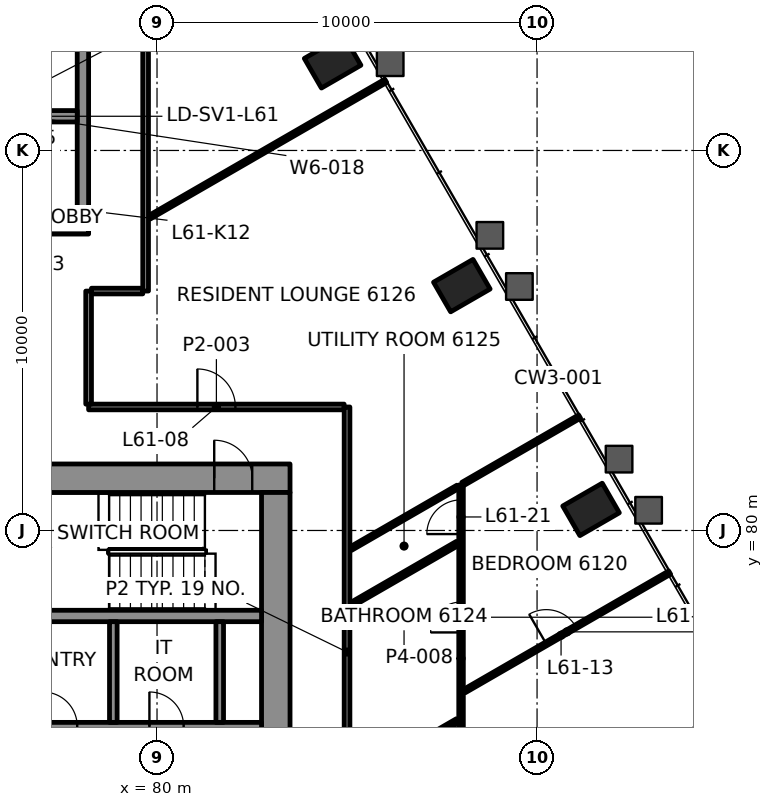
"""IFC4 building model, lengths in metres.
Left out: names, types, materials, properties, quantities, classifications, styles, units other than length and angle.
Written with IfcOpenShell. Run it as: python <this file> out.ifc"""

import sys

from ifc_helpers import new_model, si_unit, direction, frame, frame_2d, origin, origin_2d, place, context, subcontext, project, spatial, rectangle, hollow_rectangle, extrude, element, fill, save


model = new_model("IFC4")
c1 = context("Model", 3, precision=1e-05, world=origin(), true_north=direction((0.0, 1.0)))
c2 = subcontext(c1, "Body", "Model", "MODEL_VIEW")
j1 = project(units=[si_unit("LENGTHUNIT", "METRE"), si_unit("PLANEANGLEUNIT", "RADIAN")], contexts=[c1])
p1 = place(None, origin())
s1 = spatial("IfcSite", under=j1, at=p1, CompositionType="ELEMENT")
p2 = place(p1, origin())
s2 = spatial("IfcBuilding", under=s1, at=p2, CompositionType="ELEMENT")
p3 = place(p2, frame((0.0, 0.0, 260.1)))
s3 = spatial("IfcBuildingStorey", under=s2, at=p3, CompositionType="ELEMENT", Elevation=260.1)
for number, where, z_axis, x_axis in (
    (1, (94.821, 74.666, -0.0), (0.0, 0.0, 1.0), (-0.5, 0.866, 0.0)),
    (2, (91.421, 80.554, -0.0), (0.0, 0.0, 1.0), (-0.5, 0.866, 0.0)),
    (3, (88.021, 86.443, -0.0), (0.0, 0.0, 1.0), (-0.5, 0.866, 0.0)),
    (4, (84.621, 92.332, -0.0), (0.0, 0.0, 1.0), (-0.5, 0.866, 0.0)),
):
    element("IfcColumn", number, at=place(p3, frame(where, z_axis=z_axis, x_axis=x_axis)), inside=s3, PredefinedType="COLUMN", context=c2, shape_type="SweptSolid", body=[
        extrude(hollow_rectangle(XDim=0.9, YDim=1.2, WallThickness=0.06, at=origin_2d()), origin(), (0.0, 0.0, 1.0), 3.5),
    ])
p4 = place(p3, frame((66.5, 81.375, 0.0), z_axis=(0.0, 0.0, 1.0), x_axis=(1.0, 0.0, 0.0)))
e5 = element("IfcWall", 5, at=p4, inside=s3, PredefinedType="SHEAR", context=c2, shape_type="SweptSolid", body=[
    extrude(rectangle(XDim=17.0, YDim=0.75, at=frame_2d((8.5, 0.0))), origin(), (0.0, 0.0, 1.0), 3.3),
])
p5 = place(p4, frame((1.195, 0.0, 0.0)))
e6 = element("IfcOpeningElement", 6, at=p5, cuts=e5, PredefinedType="OPENING", context=c2, shape_type="SweptSolid", body=[
    extrude(rectangle(XDim=1.0, YDim=2.1, at=frame_2d((0.5, 1.05))), frame((0.0, 0.385, 0.0), z_axis=(0.0, -1.0, 0.0), x_axis=(1.0, 0.0, 0.0)), (0.0, 0.0, 1.0), 0.77),
])
p6 = place(p4, frame((15.005, 0.0, 0.0)))
e7 = element("IfcOpeningElement", 7, at=p6, cuts=e5, PredefinedType="OPENING", context=c2, shape_type="SweptSolid", body=[
    extrude(rectangle(XDim=1.0, YDim=2.1, at=frame_2d((0.5, 1.05))), frame((0.0, 0.385, 0.0), z_axis=(0.0, -1.0, 0.0), x_axis=(1.0, 0.0, 0.0)), (0.0, 0.0, 1.0), 0.77),
])
p7 = place(p4, frame((8.15, 0.0, 0.0)))
e8 = element("IfcOpeningElement", 8, at=p7, cuts=e5, PredefinedType="OPENING", context=c2, shape_type="SweptSolid", body=[
    extrude(rectangle(XDim=0.9, YDim=2.1, at=frame_2d((0.45, 1.05))), frame((0.0, 0.385, 0.0), z_axis=(0.0, -1.0, 0.0), x_axis=(1.0, 0.0, 0.0)), (0.0, 0.0, 1.0), 0.77),
])
p8 = place(p3, frame((83.125, 69.0, 0.0), z_axis=(0.0, 0.0, 1.0), x_axis=(0.0, 1.0, 0.0)))
e9 = element("IfcWall", 9, at=p8, inside=s3, PredefinedType="SHEAR", context=c2, shape_type="SweptSolid", body=[
    extrude(rectangle(XDim=12.0, YDim=0.75, at=frame_2d((6.0, 0.0))), origin(), (0.0, 0.0, 1.0), 3.3),
])
p9 = place(p8, frame((3.4, 0.0, 0.0)))
e10 = element("IfcOpeningElement", 10, at=p9, cuts=e9, PredefinedType="OPENING", context=c2, shape_type="SweptSolid", body=[
    extrude(rectangle(XDim=1.8, YDim=2.1, at=frame_2d((0.9, 1.05))), frame((0.0, 0.385, 0.0), z_axis=(0.0, -1.0, 0.0), x_axis=(1.0, 0.0, 0.0)), (0.0, 0.0, 1.0), 0.77),
])
p10 = place(p3, frame((67.25, 77.75, 0.0), z_axis=(0.0, 0.0, 1.0), x_axis=(1.0, 0.0, 0.0)))
e11 = element("IfcWall", 11, at=p10, inside=s3, PredefinedType="SHEAR", context=c2, shape_type="SweptSolid", body=[
    extrude(rectangle(XDim=15.5, YDim=0.3, at=frame_2d((7.75, 0.0))), origin(), (0.0, 0.0, 1.0), 3.3),
])
p11 = place(p10, frame((0.445, 0.0, 0.0)))
e12 = element("IfcOpeningElement", 12, at=p11, cuts=e11, PredefinedType="OPENING", context=c2, shape_type="SweptSolid", body=[
    extrude(rectangle(XDim=1.0, YDim=2.1, at=frame_2d((0.5, 1.05))), frame((0.0, 0.16, 0.0), z_axis=(0.0, -1.0, 0.0), x_axis=(1.0, 0.0, 0.0)), (0.0, 0.0, 1.0), 0.32),
])
p12 = place(p3, frame((71.8, 87.95, 0.0), z_axis=(0.0, 0.0, 1.0), x_axis=(1.0, 0.0, 0.0)))
e13 = element("IfcWall", 13, at=p12, inside=s3, PredefinedType="SHEAR", context=c2, shape_type="SweptSolid", body=[
    extrude(rectangle(XDim=6.4, YDim=0.3, at=frame_2d((3.2, 0.0))), origin(), (0.0, 0.0, 1.0), 3.3),
])
p13 = place(p12, frame((1.325, 0.0, 0.0)))
e14 = element("IfcOpeningElement", 14, at=p13, cuts=e13, PredefinedType="OPENING", context=c2, shape_type="SweptSolid", body=[
    extrude(rectangle(XDim=1.0, YDim=2.1, at=frame_2d((0.5, 1.05))), frame((0.0, 0.16, 0.0), z_axis=(0.0, -1.0, 0.0), x_axis=(1.0, 0.0, 0.0)), (0.0, 0.0, 1.0), 0.32),
])
p14 = place(p12, frame((4.125, 0.0, 0.0)))
e15 = element("IfcOpeningElement", 15, at=p14, cuts=e13, PredefinedType="OPENING", context=c2, shape_type="SweptSolid", body=[
    extrude(rectangle(XDim=1.2, YDim=2.1, at=frame_2d((0.6, 1.05))), frame((0.0, 0.16, 0.0), z_axis=(0.0, -1.0, 0.0), x_axis=(1.0, 0.0, 0.0)), (0.0, 0.0, 1.0), 0.32),
])
p15 = place(p3, frame((78.05, 88.1, 0.0), z_axis=(0.0, 0.0, 1.0), x_axis=(0.0, 1.0, 0.0)))
e16 = element("IfcWall", 16, at=p15, inside=s3, PredefinedType="SHEAR", context=c2, shape_type="SweptSolid", body=[
    extrude(rectangle(XDim=6.2, YDim=0.3, at=frame_2d((3.1, 0.0))), origin(), (0.0, 0.0, 1.0), 3.3),
])
p16 = place(p3, frame((75.3, 90.9, 0.0), z_axis=(0.0, 0.0, 1.0), x_axis=(1.0, 0.0, 0.0)))
e17 = element("IfcWall", 17, at=p16, inside=s3, PredefinedType="SHEAR", context=c2, shape_type="SweptSolid", body=[
    extrude(rectangle(XDim=2.6, YDim=0.3, at=frame_2d((1.3, 0.0))), origin(), (0.0, 0.0, 1.0), 3.3),
])
p17 = place(p16, frame((0.675, 0.0, 0.0)))
e18 = element("IfcOpeningElement", 18, at=p17, cuts=e17, PredefinedType="OPENING", context=c2, shape_type="SweptSolid", body=[
    extrude(rectangle(XDim=1.1, YDim=2.1, at=frame_2d((0.55, 1.05))), frame((0.0, 0.16, 0.0), z_axis=(0.0, -1.0, 0.0), x_axis=(1.0, 0.0, 0.0)), (0.0, 0.0, 1.0), 0.32),
])
p18 = place(p3, frame((78.2, 83.25, 0.0), z_axis=(0.0, 0.0, 1.0), x_axis=(1.0, 0.0, 0.0)))
e19 = element("IfcWall", 19, at=p18, inside=s3, PredefinedType="PARTITIONING", context=c2, shape_type="SweptSolid", body=[
    extrude(rectangle(XDim=6.725, YDim=0.15, at=frame_2d((3.362, 0.0))), origin(), (0.0, 0.0, 1.0), 2.7),
])
p19 = place(p18, frame((2.862, 0.0, 0.0)))
e20 = element("IfcOpeningElement", 20, at=p19, cuts=e19, PredefinedType="OPENING", context=c2, shape_type="SweptSolid", body=[
    extrude(rectangle(XDim=1.0, YDim=2.1, at=frame_2d((0.5, 1.05))), frame((0.0, 0.085, 0.0), z_axis=(0.0, -1.0, 0.0), x_axis=(1.0, 0.0, 0.0)), (0.0, 0.0, 1.0), 0.17),
])
p20 = place(p3, frame((78.275, 86.3, 0.0), z_axis=(0.0, 0.0, 1.0), x_axis=(1.0, 0.0, 0.0)))
e21 = element("IfcWall", 21, at=p20, inside=s3, PredefinedType="PARTITIONING", context=c2, shape_type="SweptSolid", body=[
    extrude(rectangle(XDim=1.35, YDim=0.15, at=frame_2d((0.675, 0.0))), origin(), (0.0, 0.0, 1.0), 2.7),
])
p21 = place(p3, frame((85.11, 73.379, 0.0), z_axis=(0.0, 0.0, 1.0), x_axis=(0.866000447062, 0.500043223821, 0.0)))
e22 = element("IfcWall", 22, at=p21, inside=s3, PredefinedType="PARTITIONING", context=c2, shape_type="SweptSolid", body=[
    extrude(rectangle(XDim=3.228, YDim=0.12, at=frame_2d((1.614, 0.0))), origin(), (0.0, 0.0, 1.0), 2.7),
])
p22 = place(p3, frame((88.086, 75.773, 0.0), z_axis=(0.0, 0.0, 1.0), x_axis=(0.86602136159, 0.500007001221, 0.0)))
e23 = element("IfcWall", 23, at=p22, inside=s3, PredefinedType="PARTITIONING", context=c2, shape_type="SweptSolid", body=[
    extrude(rectangle(XDim=6.239, YDim=0.1, at=frame_2d((3.119, 0.0))), origin(), (0.0, 0.0, 1.0), 2.688),
])
p23 = place(p22, frame((2.489, 0.0, 0.0)))
e24 = element("IfcOpeningElement", 24, at=p23, cuts=e23, PredefinedType="OPENING", context=c2, shape_type="SweptSolid", body=[
    extrude(rectangle(XDim=0.9, YDim=2.1, at=frame_2d((0.45, 1.05))), frame((0.0, 0.06, 0.0), z_axis=(0.0, -1.0, 0.0), x_axis=(1.0, 0.0, 0.0)), (0.0, 0.0, 1.0), 0.12),
])
p24 = place(p3, frame((85.109, 78.046, 0.0), z_axis=(0.0, 0.0, 1.0), x_axis=(0.866033195618, 0.499986503906, 0.0)))
e25 = element("IfcWall", 25, at=p24, inside=s3, PredefinedType="PARTITIONING", context=c2, shape_type="SweptSolid", body=[
    extrude(rectangle(XDim=3.228, YDim=0.12, at=frame_2d((1.614, 0.0))), origin(), (0.0, 0.0, 1.0), 2.7),
])
p25 = place(p3, frame((85.101, 79.523, 0.0), z_axis=(0.0, 0.0, 1.0), x_axis=(0.866029195513, 0.499993432475, 0.0)))
e26 = element("IfcWall", 26, at=p25, inside=s3, PredefinedType="PARTITIONING", context=c2, shape_type="SweptSolid", body=[
    extrude(rectangle(XDim=3.25, YDim=0.1, at=frame_2d((1.625, 0.0))), origin(), (0.0, 0.0, 1.0), 2.7),
])
p26 = place(p3, frame((79.801, 88.241, 0.0), z_axis=(0.0, 0.0, 1.0), x_axis=(0.866016264047, 0.500015830155, 0.0)))
e27 = element("IfcWall", 27, at=p26, inside=s3, PredefinedType="PARTITIONING", context=c2, shape_type="SweptSolid", body=[
    extrude(rectangle(XDim=7.179, YDim=0.1, at=frame_2d((3.59, 0.0))), origin(), (0.0, 0.0, 1.0), 2.688),
])
p27 = place(p3, frame((88.0, 72.067, 0.0), z_axis=(0.0, 0.0, 1.0), x_axis=(0.0, 1.0, 0.0)))
e28 = element("IfcWall", 28, at=p27, inside=s3, PredefinedType="PARTITIONING", context=c2, shape_type="SweptSolid", body=[
    extrude(rectangle(XDim=9.13, YDim=0.12, at=frame_2d((4.565, 0.0))), origin(), (0.0, 0.0, 1.0), 2.7),
])
p28 = place(p27, frame((1.142, 0.0, 0.0)))
e29 = element("IfcOpeningElement", 29, at=p28, cuts=e28, PredefinedType="OPENING", context=c2, shape_type="SweptSolid", body=[
    extrude(rectangle(XDim=0.9, YDim=2.1, at=frame_2d((0.45, 1.05))), frame((0.0, 0.07, 0.0), z_axis=(0.0, -1.0, 0.0), x_axis=(1.0, 0.0, 0.0)), (0.0, 0.0, 1.0), 0.14),
])
p29 = place(p27, frame((5.25, 0.0, 0.0)))
e30 = element("IfcOpeningElement", 30, at=p29, cuts=e28, PredefinedType="OPENING", context=c2, shape_type="SweptSolid", body=[
    extrude(rectangle(XDim=0.8, YDim=2.1, at=frame_2d((0.4, 1.05))), frame((0.0, 0.07, 0.0), z_axis=(0.0, -1.0, 0.0), x_axis=(1.0, 0.0, 0.0)), (0.0, 0.0, 1.0), 0.14),
])
p30 = place(p27, frame((7.838, 0.0, 0.0)))
e31 = element("IfcOpeningElement", 31, at=p30, cuts=e28, PredefinedType="OPENING", context=c2, shape_type="SweptSolid", body=[
    extrude(rectangle(XDim=0.9, YDim=2.1, at=frame_2d((0.45, 1.05))), frame((0.0, 0.07, 0.0), z_axis=(0.0, -1.0, 0.0), x_axis=(1.0, 0.0, 0.0)), (0.0, 0.0, 1.0), 0.14),
])
p31 = place(p3, frame((85.0, 70.352, 0.0), z_axis=(0.0, 0.0, 1.0), x_axis=(0.0, 1.0, 0.0)))
e32 = element("IfcWall", 32, at=p31, inside=s3, PredefinedType="PARTITIONING", context=c2, shape_type="SweptSolid", body=[
    extrude(rectangle(XDim=12.897, YDim=0.15, at=frame_2d((6.449, 0.0))), origin(), (0.0, 0.0, 1.0), 2.7),
])
p32 = place(p3, frame((79.7, 86.301, 0.0), z_axis=(0.0, 0.0, 1.0), x_axis=(0.0, 1.0, 0.0)))
e33 = element("IfcWall", 33, at=p32, inside=s3, PredefinedType="PARTITIONING", context=c2, shape_type="SweptSolid", body=[
    extrude(rectangle(XDim=9.799, YDim=0.15, at=frame_2d((4.899, 0.0))), origin(), (0.0, 0.0, 1.0), 2.7),
])
p33 = place(p3, frame((78.2, 83.325, 0.0), z_axis=(0.0, 0.0, 1.0), x_axis=(0.0, 1.0, 0.0)))
e34 = element("IfcWall", 34, at=p33, inside=s3, PredefinedType="PARTITIONING", context=c2, shape_type="SweptSolid", body=[
    extrude(rectangle(XDim=2.975, YDim=0.15, at=frame_2d((1.488, 0.0))), origin(), (0.0, 0.0, 1.0), 2.622),
])
p34 = place(p3, frame((88.045, 81.223, 0.0), z_axis=(0.0, 0.0, 1.0), x_axis=(0.866020634781, 0.500008260065, 0.0)))
e35 = element("IfcWall", 35, at=p34, inside=s3, PredefinedType="PARTITIONING", context=c2, shape_type="SweptSolid", body=[
    extrude(rectangle(XDim=3.549, YDim=0.1, at=frame_2d((1.775, 0.0))), origin(), (0.0, 0.0, 1.0), 2.688),
])
p35 = place(p3, frame((76.2, 74.85, 0.0), z_axis=(0.0, 0.0, 1.0), x_axis=(1.0, 0.0, 0.0)))
e36 = element("IfcWall", 36, at=p35, inside=s3, PredefinedType="PARTITIONING", context=c2, shape_type="SweptSolid", body=[
    extrude(rectangle(XDim=6.55, YDim=0.2, at=frame_2d((3.275, 0.0))), origin(), (0.0, 0.0, 1.0), 3.3),
])
p36 = place(p35, frame((0.8, 0.0, 0.0)))
e37 = element("IfcOpeningElement", 37, at=p36, cuts=e36, PredefinedType="OPENING", context=c2, shape_type="SweptSolid", body=[
    extrude(rectangle(XDim=0.9, YDim=2.1, at=frame_2d((0.45, 1.05))), frame((0.0, 0.11, 0.0), z_axis=(0.0, -1.0, 0.0), x_axis=(1.0, 0.0, 0.0)), (0.0, 0.0, 1.0), 0.22),
])
p37 = place(p35, frame((3.6, 0.0, 0.0)))
e38 = element("IfcOpeningElement", 38, at=p37, cuts=e36, PredefinedType="OPENING", context=c2, shape_type="SweptSolid", body=[
    extrude(rectangle(XDim=0.9, YDim=2.1, at=frame_2d((0.45, 1.05))), frame((0.0, 0.11, 0.0), z_axis=(0.0, -1.0, 0.0), x_axis=(1.0, 0.0, 0.0)), (0.0, 0.0, 1.0), 0.22),
])
for number, where, z_axis, x_axis in (
    (39, (78.85, 74.95, 0.0), (0.0, 0.0, 1.0), (0.0, 1.0, 0.0)),
    (40, (81.65, 74.95, 0.0), (0.0, 0.0, 1.0), (0.0, 1.0, 0.0)),
):
    element("IfcWall", number, at=place(p3, frame(where, z_axis=z_axis, x_axis=x_axis)), inside=s3, PredefinedType="PARTITIONING", context=c2, shape_type="SweptSolid", body=[
        extrude(rectangle(XDim=2.65, YDim=0.2, at=frame_2d((1.325, 0.0))), origin(), (0.0, 0.0, 1.0), 3.3),
    ])
p38 = place(p19, origin())
e41 = element("IfcDoor", 41, at=p38, inside=s3, OperationType="SINGLE_SWING_LEFT", PredefinedType="DOOR", context=c2, shape_type="SweptSolid", body=[
    extrude(rectangle(XDim=1.0, YDim=2.1, at=frame_2d((0.5, 1.05))), frame((0.0, 0.025, 0.0), z_axis=(0.0, -1.0, 0.0), x_axis=(1.0, 0.0, 0.0)), (0.0, 0.0, 1.0), 0.05),
])
fill(e20, e41)
p39 = place(p23, origin())
e42 = element("IfcDoor", 42, at=p39, inside=s3, OperationType="SINGLE_SWING_LEFT", PredefinedType="DOOR", context=c2, shape_type="SweptSolid", body=[
    extrude(rectangle(XDim=0.9, YDim=2.1, at=frame_2d((0.45, 1.05))), frame((0.0, 0.025, 0.0), z_axis=(0.0, -1.0, 0.0), x_axis=(1.0, 0.0, 0.0)), (0.0, 0.0, 1.0), 0.05),
])
fill(e24, e42)
p40 = place(p29, origin())
e43 = element("IfcDoor", 43, at=p40, inside=s3, OperationType="SINGLE_SWING_LEFT", PredefinedType="DOOR", context=c2, shape_type="SweptSolid", body=[
    extrude(rectangle(XDim=0.8, YDim=2.1, at=frame_2d((0.4, 1.05))), frame((0.0, 0.025, 0.0), z_axis=(0.0, -1.0, 0.0), x_axis=(1.0, 0.0, 0.0)), (0.0, 0.0, 1.0), 0.05),
])
fill(e30, e43)
p41 = place(p30, origin())
e44 = element("IfcDoor", 44, at=p41, inside=s3, OperationType="SINGLE_SWING_RIGHT", PredefinedType="DOOR", context=c2, shape_type="SweptSolid", body=[
    extrude(rectangle(XDim=0.9, YDim=2.1, at=frame_2d((0.45, 1.05))), frame((0.0, 0.025, 0.0), z_axis=(0.0, -1.0, 0.0), x_axis=(1.0, 0.0, 0.0)), (0.0, 0.0, 1.0), 0.05),
])
fill(e31, e44)
p42 = place(p6, origin())
e45 = element("IfcDoor", 45, at=p42, inside=s3, OperationType="SINGLE_SWING_LEFT", PredefinedType="DOOR", context=c2, shape_type="SweptSolid", body=[
    extrude(rectangle(XDim=1.0, YDim=2.1, at=frame_2d((0.5, 1.05))), frame((0.0, 0.095, 0.0), z_axis=(0.0, -1.0, 0.0), x_axis=(1.0, 0.0, 0.0)), (0.0, 0.0, 1.0), 0.19),
])
fill(e7, e45)
p43 = place(p36, origin())
e46 = element("IfcDoor", 46, at=p43, inside=s3, OperationType="SINGLE_SWING_RIGHT", PredefinedType="DOOR", context=c2, shape_type="SweptSolid", body=[
    extrude(rectangle(XDim=0.9, YDim=2.1, at=frame_2d((0.45, 1.05))), frame((0.0, 0.025, 0.0), z_axis=(0.0, -1.0, 0.0), x_axis=(1.0, 0.0, 0.0)), (0.0, 0.0, 1.0), 0.05),
])
fill(e37, e46)
p44 = place(p37, origin())
e47 = element("IfcDoor", 47, at=p44, inside=s3, OperationType="SINGLE_SWING_LEFT", PredefinedType="DOOR", context=c2, shape_type="SweptSolid", body=[
    extrude(rectangle(XDim=0.9, YDim=2.1, at=frame_2d((0.45, 1.05))), frame((0.0, 0.025, 0.0), z_axis=(0.0, -1.0, 0.0), x_axis=(1.0, 0.0, 0.0)), (0.0, 0.0, 1.0), 0.05),
])
fill(e38, e47)
save(model, sys.argv[1])
